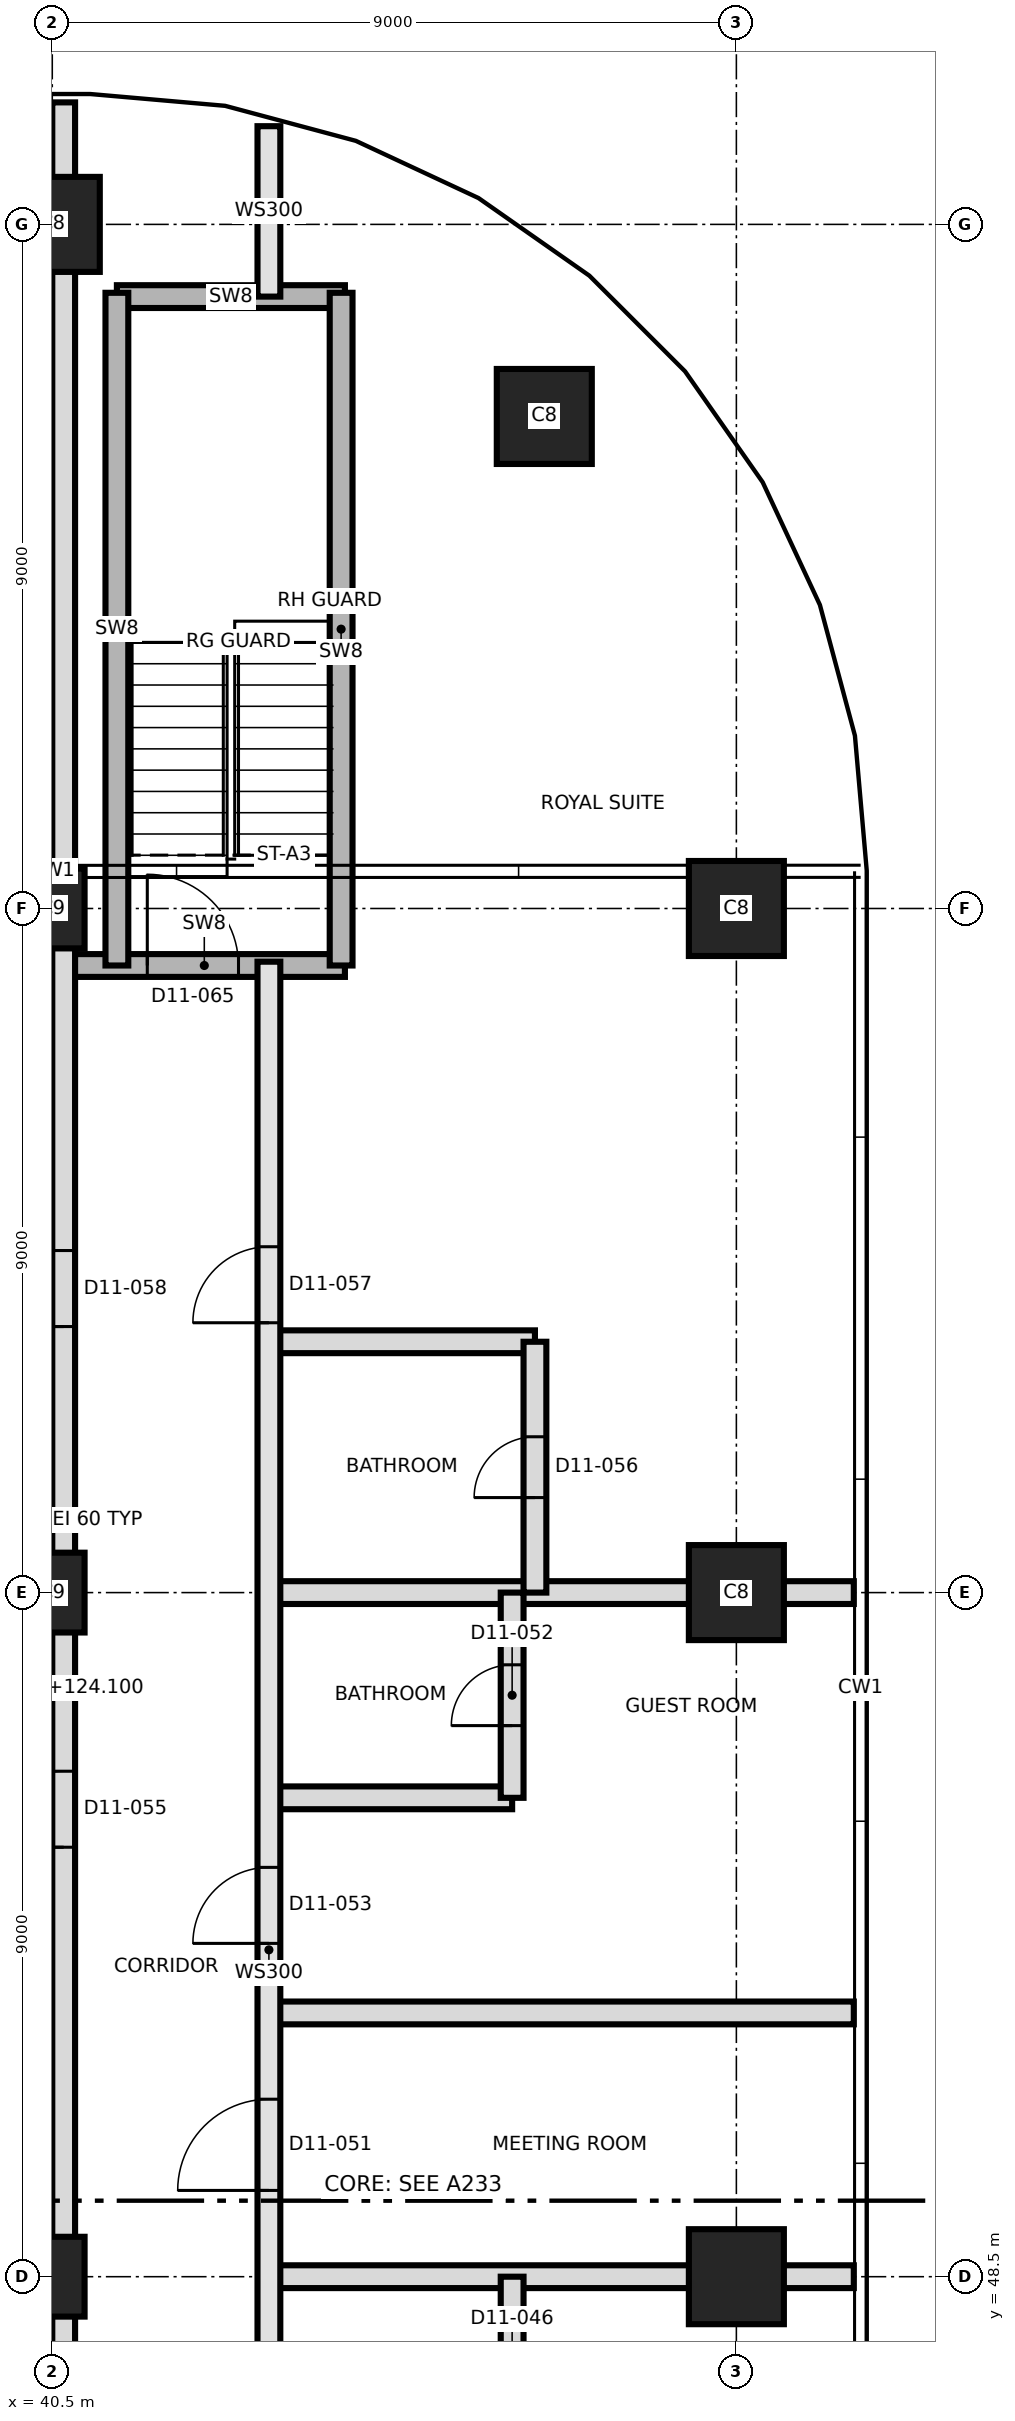
"""IFC4 building model, lengths in metres.
Left out: names, types, materials, properties, quantities, classifications, styles, units other than length and angle.
Written with IfcOpenShell. Run it as: python <this file> out.ifc"""

import sys

from ifc_helpers import new_model, si_unit, direction, frame, frame_2d, origin, origin_2d, place, context, subcontext, project, spatial, rectangle, extrude, element, fill, save


model = new_model("IFC4")
c1 = context("Model", 3, precision=1e-05, world=origin(), true_north=direction((0.0, 1.0)))
c2 = subcontext(c1, "Body", "Model", "MODEL_VIEW")
j1 = project(units=[si_unit("LENGTHUNIT", "METRE"), si_unit("PLANEANGLEUNIT", "RADIAN")], contexts=[c1])
p1 = place(None, origin())
s1 = spatial("IfcSite", under=j1, at=p1, CompositionType="ELEMENT")
p2 = place(p1, origin())
s2 = spatial("IfcBuilding", under=s1, at=p2, CompositionType="ELEMENT")
p3 = place(p2, frame((0.0, 0.0, 124.1)))
s3 = spatial("IfcBuildingStorey", under=s2, at=p3, CompositionType="ELEMENT", Elevation=124.1)
p4 = place(p3, frame((40.5, 48.5, 0.0), z_axis=(0.0, 0.0, 1.0), x_axis=(0.0, 1.0, 0.0)))
e1 = element("IfcColumn", 1, at=p4, inside=s3, PredefinedType="COLUMN", context=c2, shape_type="SweptSolid", body=[
    extrude(rectangle(XDim=1.05, YDim=0.85, at=origin_2d()), origin(), (0.0, 0.0, 1.0), 3.7),
])
p5 = place(p3, frame((49.5, 48.5, 0.0), z_axis=(0.0, 0.0, 1.0), x_axis=(1.0, 0.0, 0.0)))
e2 = element("IfcColumn", 2, at=p5, inside=s3, PredefinedType="COLUMN", context=c2, shape_type="SweptSolid", body=[
    extrude(rectangle(XDim=1.25, YDim=1.25, at=origin_2d()), origin(), (0.0, 0.0, 1.0), 3.7),
])
p6 = place(p3, frame((40.5, 57.5, 0.0), z_axis=(0.0, 0.0, 1.0), x_axis=(0.0, 1.0, 0.0)))
e3 = element("IfcColumn", 3, at=p6, inside=s3, PredefinedType="COLUMN", context=c2, shape_type="SweptSolid", body=[
    extrude(rectangle(XDim=1.05, YDim=0.85, at=origin_2d()), origin(), (0.0, 0.0, 1.0), 3.7),
])
p7 = place(p3, frame((49.5, 57.5, 0.0), z_axis=(0.0, 0.0, 1.0), x_axis=(1.0, 0.0, 0.0)))
e4 = element("IfcColumn", 4, at=p7, inside=s3, PredefinedType="COLUMN", context=c2, shape_type="SweptSolid", body=[
    extrude(rectangle(XDim=1.25, YDim=1.25, at=origin_2d()), origin(), (0.0, 0.0, 1.0), 3.7),
])
p8 = place(p3, frame((40.5, 66.5, 0.0), z_axis=(0.0, 0.0, 1.0), x_axis=(0.0, 1.0, 0.0)))
e5 = element("IfcColumn", 5, at=p8, inside=s3, PredefinedType="COLUMN", context=c2, shape_type="SweptSolid", body=[
    extrude(rectangle(XDim=1.05, YDim=0.85, at=origin_2d()), origin(), (0.0, 0.0, 1.0), 3.7),
])
for number, where, z_axis, x_axis in (
    (6, (49.5, 66.5, 0.0), (0.0, 0.0, 1.0), (1.0, 0.0, 0.0)),
    (7, (46.973, 72.973, 0.0), (0.0, 0.0, 1.0), (1.0, 0.0, 0.0)),
    (8, (40.5, 75.5, 0.0), (0.0, 0.0, 1.0), (1.0, 0.0, 0.0)),
):
    element("IfcColumn", number, at=place(p3, frame(where, z_axis=z_axis, x_axis=x_axis)), inside=s3, PredefinedType="COLUMN", context=c2, shape_type="SweptSolid", body=[
        extrude(rectangle(XDim=1.25, YDim=1.25, at=origin_2d()), origin(), (0.0, 0.0, 1.0), 3.7),
    ])
p9 = place(p3, frame((30.135, 48.5, 0.0), z_axis=(0.0, 0.0, 1.0), x_axis=(1.0, 0.0, 0.0)))
e9 = element("IfcWall", 9, at=p9, inside=s3, PredefinedType="PARTITIONING", context=c2, shape_type="SweptSolid", body=[
    extrude(rectangle(XDim=10.515, YDim=0.3, at=frame_2d((5.257, 0.0))), origin(), (0.0, 0.0, 1.0), 3.4),
])
p10 = place(p3, frame((43.35, 48.5, 0.0), z_axis=(0.0, 0.0, 1.0), x_axis=(1.0, 0.0, 0.0)))
e10 = element("IfcWall", 10, at=p10, inside=s3, PredefinedType="PARTITIONING", context=c2, shape_type="SweptSolid", body=[
    extrude(rectangle(XDim=7.695, YDim=0.3, at=frame_2d((3.847, 0.0))), origin(), (0.0, 0.0, 1.0), 3.4),
])
p11 = place(p3, frame((37.15, 51.8, 0.0), z_axis=(0.0, 0.0, 1.0), x_axis=(1.0, 0.0, 0.0)))
e11 = element("IfcWall", 11, at=p11, inside=s3, PredefinedType="PARTITIONING", context=c2, shape_type="SweptSolid", body=[
    extrude(rectangle(XDim=3.5, YDim=0.3, at=frame_2d((1.75, 0.0))), origin(), (0.0, 0.0, 1.0), 3.4),
])
p12 = place(p3, frame((43.35, 51.97, 0.0), z_axis=(0.0, 0.0, 1.0), x_axis=(1.0, 0.0, 0.0)))
e12 = element("IfcWall", 12, at=p12, inside=s3, PredefinedType="PARTITIONING", context=c2, shape_type="SweptSolid", body=[
    extrude(rectangle(XDim=7.695, YDim=0.3, at=frame_2d((3.847, 0.0))), origin(), (0.0, 0.0, 1.0), 3.4),
])
p13 = place(p3, frame((43.35, 54.8, 0.0), z_axis=(0.0, 0.0, 1.0), x_axis=(1.0, 0.0, 0.0)))
e13 = element("IfcWall", 13, at=p13, inside=s3, PredefinedType="PARTITIONING", context=c2, shape_type="SweptSolid", body=[
    extrude(rectangle(XDim=3.2, YDim=0.3, at=frame_2d((1.6, 0.0))), origin(), (0.0, 0.0, 1.0), 3.4),
])
p14 = place(p3, frame((30.135, 57.5, 0.0), z_axis=(0.0, 0.0, 1.0), x_axis=(1.0, 0.0, 0.0)))
e14 = element("IfcWall", 14, at=p14, inside=s3, PredefinedType="PARTITIONING", context=c2, shape_type="SweptSolid", body=[
    extrude(rectangle(XDim=10.515, YDim=0.3, at=frame_2d((5.257, 0.0))), origin(), (0.0, 0.0, 1.0), 3.4),
])
p15 = place(p3, frame((43.35, 57.5, 0.0), z_axis=(0.0, 0.0, 1.0), x_axis=(1.0, 0.0, 0.0)))
e15 = element("IfcWall", 15, at=p15, inside=s3, PredefinedType="PARTITIONING", context=c2, shape_type="SweptSolid", body=[
    extrude(rectangle(XDim=7.695, YDim=0.3, at=frame_2d((3.847, 0.0))), origin(), (0.0, 0.0, 1.0), 3.4),
])
p16 = place(p3, frame((43.35, 60.8, 0.0), z_axis=(0.0, 0.0, 1.0), x_axis=(1.0, 0.0, 0.0)))
e16 = element("IfcWall", 16, at=p16, inside=s3, PredefinedType="PARTITIONING", context=c2, shape_type="SweptSolid", body=[
    extrude(rectangle(XDim=3.5, YDim=0.3, at=frame_2d((1.75, 0.0))), origin(), (0.0, 0.0, 1.0), 3.4),
])
p17 = place(p3, frame((40.65, 65.75, 0.0), z_axis=(0.0, 0.0, 1.0), x_axis=(1.0, 0.0, 0.0)))
e17 = element("IfcWall", 17, at=p17, inside=s3, PredefinedType="SHEAR", context=c2, shape_type="SweptSolid", body=[
    extrude(rectangle(XDim=3.7, YDim=0.3, at=frame_2d((1.85, 0.0))), origin(), (0.0, 0.0, 1.0), 3.4),
])
p18 = place(p17, frame((1.1, 0.0, 0.0)))
e18 = element("IfcOpeningElement", 18, at=p18, cuts=e17, PredefinedType="OPENING", context=c2, shape_type="SweptSolid", body=[
    extrude(rectangle(XDim=1.2, YDim=2.1, at=frame_2d((0.6, 1.05))), frame((0.0, 0.16, 0.0), z_axis=(0.0, -1.0, 0.0), x_axis=(1.0, 0.0, 0.0)), (0.0, 0.0, 1.0), 0.32),
])
p19 = place(p3, frame((30.944, 71.4, 0.0), z_axis=(0.0, 0.0, 1.0), x_axis=(1.0, 0.0, 0.0)))
e19 = element("IfcWall", 19, at=p19, inside=s3, PredefinedType="PARTITIONING", context=c2, shape_type="SweptSolid", body=[
    extrude(rectangle(XDim=9.706, YDim=0.3, at=frame_2d((4.853, 0.0))), origin(), (0.0, 0.0, 1.0), 3.4),
])
p20 = place(p19, frame((4.056, 0.0, 0.0)))
e20 = element("IfcOpeningElement", 20, at=p20, cuts=e19, PredefinedType="OPENING", context=c2, shape_type="SweptSolid", body=[
    extrude(rectangle(XDim=1.0, YDim=2.1, at=frame_2d((0.5, 1.05))), frame((0.0, 0.16, 0.0), z_axis=(0.0, -1.0, 0.0), x_axis=(1.0, 0.0, 0.0)), (0.0, 0.0, 1.0), 0.32),
])
p21 = place(p3, frame((41.35, 74.55, 0.0), z_axis=(0.0, 0.0, 1.0), x_axis=(1.0, 0.0, 0.0)))
e21 = element("IfcWall", 21, at=p21, inside=s3, PredefinedType="SHEAR", context=c2, shape_type="SweptSolid", body=[
    extrude(rectangle(XDim=3.0, YDim=0.3, at=frame_2d((1.5, 0.0))), origin(), (0.0, 0.0, 1.0), 3.4),
])
p22 = place(p3, frame((37.15, 74.7, 0.0), z_axis=(0.0, 0.0, 1.0), x_axis=(1.0, 0.0, 0.0)))
e22 = element("IfcWall", 22, at=p22, inside=s3, PredefinedType="PARTITIONING", context=c2, shape_type="SweptSolid", body=[
    extrude(rectangle(XDim=3.5, YDim=0.3, at=frame_2d((1.75, 0.0))), origin(), (0.0, 0.0, 1.0), 3.4),
])
p23 = place(p3, frame((40.65, 39.8, 0.0), z_axis=(0.0, 0.0, 1.0), x_axis=(0.0, 1.0, 0.0)))
e23 = element("IfcWall", 23, at=p23, inside=s3, PredefinedType="PARTITIONING", context=c2, shape_type="SweptSolid", body=[
    extrude(rectangle(XDim=37.305, YDim=0.3, at=frame_2d((18.652, 0.0))), origin(), (0.0, 0.0, 1.0), 3.4),
])
p24 = place(p23, frame((0.85, 0.0, 0.0)))
e24 = element("IfcOpeningElement", 24, at=p24, cuts=e23, PredefinedType="OPENING", context=c2, shape_type="SweptSolid", body=[
    extrude(rectangle(XDim=1.0, YDim=2.1, at=frame_2d((0.5, 1.05))), frame((0.0, 0.16, 0.0), z_axis=(0.0, -1.0, 0.0), x_axis=(1.0, 0.0, 0.0)), (0.0, 0.0, 1.0), 0.32),
])
p25 = place(p23, frame((6.7, 0.0, 0.0)))
e25 = element("IfcOpeningElement", 25, at=p25, cuts=e23, PredefinedType="OPENING", context=c2, shape_type="SweptSolid", body=[
    extrude(rectangle(XDim=1.0, YDim=2.1, at=frame_2d((0.5, 1.05))), frame((0.0, 0.16, 0.0), z_axis=(0.0, -1.0, 0.0), x_axis=(1.0, 0.0, 0.0)), (0.0, 0.0, 1.0), 0.32),
])
p26 = place(p23, frame((14.35, 0.0, 0.0)))
e26 = element("IfcOpeningElement", 26, at=p26, cuts=e23, PredefinedType="OPENING", context=c2, shape_type="SweptSolid", body=[
    extrude(rectangle(XDim=1.0, YDim=2.4, at=frame_2d((0.5, 1.2))), frame((0.0, 0.16, 0.0), z_axis=(0.0, -1.0, 0.0), x_axis=(1.0, 0.0, 0.0)), (0.0, 0.0, 1.0), 0.32),
])
p27 = place(p23, frame((21.2, 0.0, 0.0)))
e27 = element("IfcOpeningElement", 27, at=p27, cuts=e23, PredefinedType="OPENING", context=c2, shape_type="SweptSolid", body=[
    extrude(rectangle(XDim=1.0, YDim=2.4, at=frame_2d((0.5, 1.2))), frame((0.0, 0.16, 0.0), z_axis=(0.0, -1.0, 0.0), x_axis=(1.0, 0.0, 0.0)), (0.0, 0.0, 1.0), 0.32),
])
p28 = place(p3, frame((41.35, 65.75, 0.0), z_axis=(0.0, 0.0, 1.0), x_axis=(0.0, 1.0, 0.0)))
e28 = element("IfcWall", 28, at=p28, inside=s3, PredefinedType="SHEAR", context=c2, shape_type="SweptSolid", body=[
    extrude(rectangle(XDim=8.85, YDim=0.3, at=frame_2d((4.425, 0.0))), origin(), (0.0, 0.0, 1.0), 3.4),
])
p29 = place(p3, frame((43.35, 39.8, 0.0), z_axis=(0.0, 0.0, 1.0), x_axis=(0.0, 1.0, 0.0)))
e29 = element("IfcWall", 29, at=p29, inside=s3, PredefinedType="SOLIDWALL", context=c2, shape_type="SweptSolid", body=[
    extrude(rectangle(XDim=26.0, YDim=0.3, at=frame_2d((13.0, 0.0))), origin(), (0.0, 0.0, 1.0), 3.4),
])
p30 = place(p29, frame((1.4, 0.0, 0.0)))
e30 = element("IfcOpeningElement", 30, at=p30, cuts=e29, PredefinedType="OPENING", context=c2, shape_type="SweptSolid", body=[
    extrude(rectangle(XDim=1.2, YDim=2.1, at=frame_2d((0.6, 1.05))), frame((0.0, 0.16, 0.0), z_axis=(0.0, -1.0, 0.0), x_axis=(1.0, 0.0, 0.0)), (0.0, 0.0, 1.0), 0.32),
])
p31 = place(p29, frame((4.65, 0.0, 0.0)))
e31 = element("IfcOpeningElement", 31, at=p31, cuts=e29, PredefinedType="OPENING", context=c2, shape_type="SweptSolid", body=[
    extrude(rectangle(XDim=1.0, YDim=2.1, at=frame_2d((0.5, 1.05))), frame((0.0, 0.16, 0.0), z_axis=(0.0, -1.0, 0.0), x_axis=(1.0, 0.0, 0.0)), (0.0, 0.0, 1.0), 0.32),
])
p32 = place(p29, frame((9.835, 0.0, 0.0)))
e32 = element("IfcOpeningElement", 32, at=p32, cuts=e29, PredefinedType="OPENING", context=c2, shape_type="SweptSolid", body=[
    extrude(rectangle(XDim=1.2, YDim=2.1, at=frame_2d((0.6, 1.05))), frame((0.0, 0.16, 0.0), z_axis=(0.0, -1.0, 0.0), x_axis=(1.0, 0.0, 0.0)), (0.0, 0.0, 1.0), 0.32),
])
p33 = place(p29, frame((13.085, 0.0, 0.0)))
e33 = element("IfcOpeningElement", 33, at=p33, cuts=e29, PredefinedType="OPENING", context=c2, shape_type="SweptSolid", body=[
    extrude(rectangle(XDim=1.0, YDim=2.1, at=frame_2d((0.5, 1.05))), frame((0.0, 0.16, 0.0), z_axis=(0.0, -1.0, 0.0), x_axis=(1.0, 0.0, 0.0)), (0.0, 0.0, 1.0), 0.32),
])
p34 = place(p29, frame((21.25, 0.0, 0.0)))
e34 = element("IfcOpeningElement", 34, at=p34, cuts=e29, PredefinedType="OPENING", context=c2, shape_type="SweptSolid", body=[
    extrude(rectangle(XDim=1.0, YDim=2.4, at=frame_2d((0.5, 1.2))), frame((0.0, 0.16, 0.0), z_axis=(0.0, -1.0, 0.0), x_axis=(1.0, 0.0, 0.0)), (0.0, 0.0, 1.0), 0.32),
])
p35 = place(p3, frame((43.35, 74.55, 0.0), z_axis=(0.0, 0.0, 1.0), x_axis=(0.0, 1.0, 0.0)))
e35 = element("IfcWall", 35, at=p35, inside=s3, PredefinedType="SOLIDWALL", context=c2, shape_type="SweptSolid", body=[
    extrude(rectangle(XDim=2.242, YDim=0.3, at=frame_2d((1.121, 0.0))), origin(), (0.0, 0.0, 1.0), 3.4),
])
p36 = place(p3, frame((44.3, 65.75, 0.0), z_axis=(0.0, 0.0, 1.0), x_axis=(0.0, 1.0, 0.0)))
e36 = element("IfcWall", 36, at=p36, inside=s3, PredefinedType="SHEAR", context=c2, shape_type="SweptSolid", body=[
    extrude(rectangle(XDim=8.85, YDim=0.3, at=frame_2d((4.425, 0.0))), origin(), (0.0, 0.0, 1.0), 3.4),
])
p37 = place(p3, frame((46.55, 45.8, 0.0), z_axis=(0.0, 0.0, 1.0), x_axis=(0.0, 1.0, 0.0)))
e37 = element("IfcWall", 37, at=p37, inside=s3, PredefinedType="PARTITIONING", context=c2, shape_type="SweptSolid", body=[
    extrude(rectangle(XDim=2.7, YDim=0.3, at=frame_2d((1.35, 0.0))), origin(), (0.0, 0.0, 1.0), 3.4),
])
p38 = place(p37, frame((0.95, 0.0, 0.0)))
e38 = element("IfcOpeningElement", 38, at=p38, cuts=e37, PredefinedType="OPENING", context=c2, shape_type="SweptSolid", body=[
    extrude(rectangle(XDim=0.8, YDim=2.1, at=frame_2d((0.4, 1.05))), frame((0.0, 0.16, 0.0), z_axis=(0.0, -1.0, 0.0), x_axis=(1.0, 0.0, 0.0)), (0.0, 0.0, 1.0), 0.32),
])
p39 = place(p3, frame((46.55, 54.8, 0.0), z_axis=(0.0, 0.0, 1.0), x_axis=(0.0, 1.0, 0.0)))
e39 = element("IfcWall", 39, at=p39, inside=s3, PredefinedType="PARTITIONING", context=c2, shape_type="SweptSolid", body=[
    extrude(rectangle(XDim=2.7, YDim=0.3, at=frame_2d((1.35, 0.0))), origin(), (0.0, 0.0, 1.0), 3.4),
])
p40 = place(p39, frame((0.95, 0.0, 0.0)))
e40 = element("IfcOpeningElement", 40, at=p40, cuts=e39, PredefinedType="OPENING", context=c2, shape_type="SweptSolid", body=[
    extrude(rectangle(XDim=0.8, YDim=2.1, at=frame_2d((0.4, 1.05))), frame((0.0, 0.16, 0.0), z_axis=(0.0, -1.0, 0.0), x_axis=(1.0, 0.0, 0.0)), (0.0, 0.0, 1.0), 0.32),
])
p41 = place(p3, frame((46.85, 57.5, 0.0), z_axis=(0.0, 0.0, 1.0), x_axis=(0.0, 1.0, 0.0)))
e41 = element("IfcWall", 41, at=p41, inside=s3, PredefinedType="PARTITIONING", context=c2, shape_type="SweptSolid", body=[
    extrude(rectangle(XDim=3.3, YDim=0.3, at=frame_2d((1.65, 0.0))), origin(), (0.0, 0.0, 1.0), 3.4),
])
p42 = place(p41, frame((1.25, 0.0, 0.0)))
e42 = element("IfcOpeningElement", 42, at=p42, cuts=e41, PredefinedType="OPENING", context=c2, shape_type="SweptSolid", body=[
    extrude(rectangle(XDim=0.8, YDim=2.1, at=frame_2d((0.4, 1.05))), frame((0.0, 0.16, 0.0), z_axis=(0.0, -1.0, 0.0), x_axis=(1.0, 0.0, 0.0)), (0.0, 0.0, 1.0), 0.32),
])
p43 = place(p32, origin())
e43 = element("IfcDoor", 43, at=p43, inside=s3, OperationType="SINGLE_SWING_LEFT", PredefinedType="DOOR", context=c2, shape_type="SweptSolid", body=[
    extrude(rectangle(XDim=1.2, YDim=2.1, at=frame_2d((0.6, 1.05))), frame((0.0, 0.025, 0.0), z_axis=(0.0, -1.0, 0.0), x_axis=(1.0, 0.0, 0.0)), (0.0, 0.0, 1.0), 0.05),
])
fill(e32, e43)
p44 = place(p40, origin())
e44 = element("IfcDoor", 44, at=p44, inside=s3, OperationType="SINGLE_SWING_RIGHT", PredefinedType="DOOR", context=c2, shape_type="SweptSolid", body=[
    extrude(rectangle(XDim=0.8, YDim=2.1, at=frame_2d((0.4, 1.05))), frame((0.0, 0.025, 0.0), z_axis=(0.0, -1.0, 0.0), x_axis=(1.0, 0.0, 0.0)), (0.0, 0.0, 1.0), 0.05),
])
fill(e40, e44)
p45 = place(p33, origin())
e45 = element("IfcDoor", 45, at=p45, inside=s3, OperationType="SINGLE_SWING_LEFT", PredefinedType="DOOR", context=c2, shape_type="SweptSolid", body=[
    extrude(rectangle(XDim=1.0, YDim=2.1, at=frame_2d((0.5, 1.05))), frame((0.0, 0.025, 0.0), z_axis=(0.0, -1.0, 0.0), x_axis=(1.0, 0.0, 0.0)), (0.0, 0.0, 1.0), 0.05),
])
fill(e33, e45)
p46 = place(p26, origin())
e46 = element("IfcDoor", 46, at=p46, inside=s3, OperationType="SINGLE_SWING_LEFT", PredefinedType="DOOR", context=c2, shape_type="SweptSolid", body=[
    extrude(rectangle(XDim=1.0, YDim=2.4, at=frame_2d((0.5, 1.2))), frame((0.0, 0.025, 0.0), z_axis=(0.0, -1.0, 0.0), x_axis=(1.0, 0.0, 0.0)), (0.0, 0.0, 1.0), 0.05),
])
fill(e26, e46)
p47 = place(p42, origin())
e47 = element("IfcDoor", 47, at=p47, inside=s3, OperationType="SINGLE_SWING_LEFT", PredefinedType="DOOR", context=c2, shape_type="SweptSolid", body=[
    extrude(rectangle(XDim=0.8, YDim=2.1, at=frame_2d((0.4, 1.05))), frame((0.0, 0.025, 0.0), z_axis=(0.0, -1.0, 0.0), x_axis=(1.0, 0.0, 0.0)), (0.0, 0.0, 1.0), 0.05),
])
fill(e42, e47)
p48 = place(p34, origin())
e48 = element("IfcDoor", 48, at=p48, inside=s3, OperationType="SINGLE_SWING_RIGHT", PredefinedType="DOOR", context=c2, shape_type="SweptSolid", body=[
    extrude(rectangle(XDim=1.0, YDim=2.4, at=frame_2d((0.5, 1.2))), frame((0.0, 0.025, 0.0), z_axis=(0.0, -1.0, 0.0), x_axis=(1.0, 0.0, 0.0)), (0.0, 0.0, 1.0), 0.05),
])
fill(e34, e48)
p49 = place(p27, origin())
e49 = element("IfcDoor", 49, at=p49, inside=s3, OperationType="SINGLE_SWING_LEFT", PredefinedType="DOOR", context=c2, shape_type="SweptSolid", body=[
    extrude(rectangle(XDim=1.0, YDim=2.4, at=frame_2d((0.5, 1.2))), frame((0.0, 0.025, 0.0), z_axis=(0.0, -1.0, 0.0), x_axis=(1.0, 0.0, 0.0)), (0.0, 0.0, 1.0), 0.05),
])
fill(e27, e49)
p50 = place(p18, origin())
e50 = element("IfcDoor", 50, at=p50, inside=s3, OperationType="SINGLE_SWING_RIGHT", PredefinedType="DOOR", context=c2, shape_type="SweptSolid", body=[
    extrude(rectangle(XDim=1.2, YDim=2.1, at=frame_2d((0.6, 1.05))), frame((0.0, 0.025, 0.0), z_axis=(0.0, -1.0, 0.0), x_axis=(1.0, 0.0, 0.0)), (0.0, 0.0, 1.0), 0.05),
])
fill(e18, e50)
save(model, sys.argv[1])
